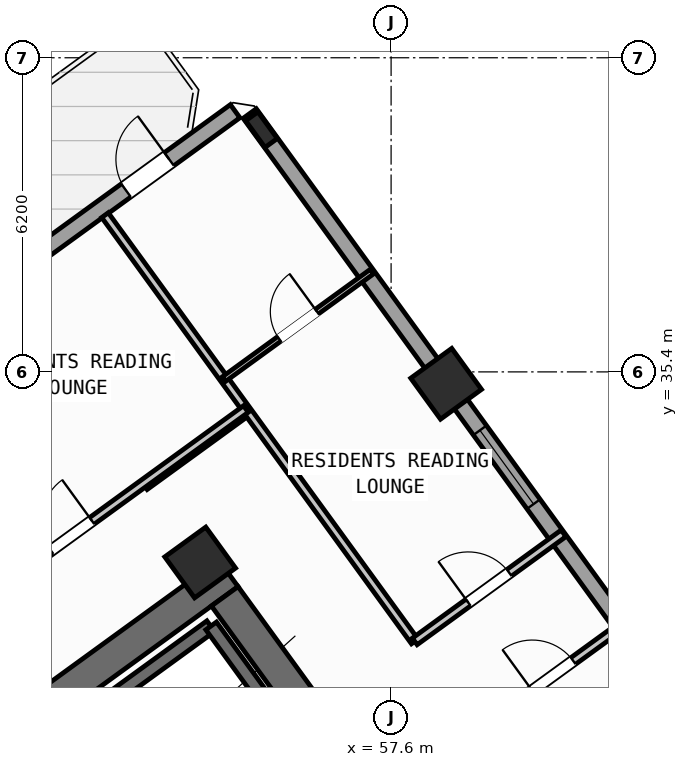
"""IFC4 building model, lengths in metres.
Left out: names, types, materials, properties, quantities, classifications, styles, units other than length and angle.
Written with IfcOpenShell. Run it as: python <this file> out.ifc"""

import sys

from ifc_helpers import new_model, si_unit, direction, frame, frame_2d, origin, origin_2d, place, context, subcontext, project, spatial, rectangle, hollow_rectangle, i_section, extrude, source, transform, mapped, element, fill, save


model = new_model("IFC4")
c1 = context("Model", 3, precision=1e-05, world=origin(), true_north=direction((0.0, 1.0)))
c2 = subcontext(c1, "Body", "Model", "MODEL_VIEW")
j1 = project(units=[si_unit("LENGTHUNIT", "METRE"), si_unit("PLANEANGLEUNIT", "RADIAN")], contexts=[c1])
p1 = place(None, origin())
s1 = spatial("IfcSite", under=j1, at=p1, CompositionType="ELEMENT")
p2 = place(p1, origin())
s2 = spatial("IfcBuilding", under=s1, at=p2, CompositionType="ELEMENT")
p3 = place(p2, frame((0.0, 0.0, 71.7)))
s3 = spatial("IfcBuildingStorey", under=s2, at=p3, CompositionType="ELEMENT", Elevation=71.7)
p4 = place(p3, frame((44.325, 24.113, 0.0), z_axis=(0.0, 0.0, 1.0), x_axis=(0.809012664862, 0.58779121131, 0.0)))
e1 = element("IfcWall", 1, at=p4, inside=s3, PredefinedType="SHEAR", context=c2, shape_type="SweptSolid", body=[
    extrude(rectangle(XDim=12.44, YDim=0.65, at=frame_2d((6.22, 0.0))), origin(), (0.0, 0.0, 1.0), 4.52),
])
p5 = place(p3, frame((58.064, 25.813, 0.0), z_axis=(0.0, 0.0, 1.0), x_axis=(-0.58777996584, 0.809020835181, 0.0)))
e2 = element("IfcWall", 2, at=p5, inside=s3, PredefinedType="SHEAR", context=c2, shape_type="SweptSolid", body=[
    extrude(rectangle(XDim=6.375, YDim=0.65, at=frame_2d((3.188, 0.0))), origin(), (0.0, 0.0, 1.0), 4.52),
])
m1 = source(origin(), c2, "Body", "SweptSolid", [
    extrude(hollow_rectangle(XDim=1.0, YDim=1.0, WallThickness=0.04, at=origin_2d()), origin(), (0.0, 0.0, 1.0), 4.8),
])
for number, where, z_axis, x_axis in (
    (3, (53.832, 31.638, 0.0), (0.0, 0.0, 1.0), (0.809, 0.588, 0.0)),
    (4, (58.686, 35.165, 0.0), (0.0, 0.0, 1.0), (0.809, 0.588, 0.0)),
):
    element("IfcColumn", number, at=place(p3, frame(where, z_axis=z_axis, x_axis=x_axis)), inside=s3, PredefinedType="COLUMN", context=c2, shape_type="MappedRepresentation", body=[
        mapped(m1, transform((0.0, 0.0, 0.0), scale=1.0)),
    ])
m2 = source(origin(), c2, "Body", "SweptSolid", [
    extrude(i_section(OverallWidth=0.3, OverallDepth=0.65, WebThickness=0.016, FlangeThickness=0.031, at=origin_2d()), origin(), (0.0, 0.0, 1.0), 4.8),
])
p6 = place(p3, frame((55.042, 40.181, 0.0), z_axis=(0.0, 0.0, 1.0), x_axis=(0.809016994375, 0.587785252292, 0.0)))
e5 = element("IfcColumn", 5, at=p6, inside=s3, PredefinedType="COLUMN", context=c2, shape_type="MappedRepresentation", body=[
    mapped(m2, transform((0.0, 0.0, 0.0), scale=1.0)),
])
p7 = place(p3, frame((42.207, 31.597, 0.0), z_axis=(0.0, 0.0, 1.0), x_axis=(0.809020333377, 0.587780656523, 0.0)))
e6 = element("IfcWall", 6, at=p7, inside=s3, PredefinedType="STANDARD", context=c2, shape_type="SweptSolid", body=[
    extrude(rectangle(XDim=15.223, YDim=0.32, at=frame_2d((7.611, 0.0))), origin(), (0.0, 0.0, 1.0), 4.52),
])
p8 = place(p7, frame((12.562, 0.0, 0.0)))
e7 = element("IfcOpeningElement", 7, at=p8, cuts=e6, PredefinedType="OPENING", context=c2, shape_type="SweptSolid", body=[
    extrude(rectangle(XDim=1.05, YDim=2.15, at=frame_2d((0.525, 1.075))), frame((0.0, 0.17, 0.0), z_axis=(0.0, -1.0, 0.0), x_axis=(1.0, 0.0, 0.0)), (0.0, 0.0, 1.0), 0.34),
])
p9 = place(p7, frame((0.868, 0.0, 0.85)))
e8 = element("IfcOpeningElement", 8, at=p9, cuts=e6, PredefinedType="OPENING", context=c2, shape_type="SweptSolid", body=[
    extrude(rectangle(XDim=1.8, YDim=1.5, at=frame_2d((0.9, 0.75))), frame((0.0, 0.17, 0.0), z_axis=(0.0, -1.0, 0.0), x_axis=(1.0, 0.0, 0.0)), (0.0, 0.0, 1.0), 0.34),
])
p10 = place(p7, frame((4.932, 0.0, 0.85)))
e9 = element("IfcOpeningElement", 9, at=p10, cuts=e6, PredefinedType="OPENING", context=c2, shape_type="SweptSolid", body=[
    extrude(rectangle(XDim=1.8, YDim=1.5, at=frame_2d((0.9, 0.75))), frame((0.0, 0.17, 0.0), z_axis=(0.0, -1.0, 0.0), x_axis=(1.0, 0.0, 0.0)), (0.0, 0.0, 1.0), 0.34),
])
p11 = place(p3, frame((54.81, 40.5, 0.0), z_axis=(0.0, 0.0, 1.0), x_axis=(0.587783625747, -0.809018176127, 0.0)))
e10 = element("IfcWall", 10, at=p11, inside=s3, PredefinedType="STANDARD", context=c2, shape_type="SweptSolid", body=[
    extrude(rectangle(XDim=21.587, YDim=0.32, at=frame_2d((10.794, 0.0))), origin(), (0.0, 0.0, 1.0), 3.895),
])
p12 = place(p11, frame((7.729, 0.0, 0.85)))
e11 = element("IfcOpeningElement", 11, at=p12, cuts=e10, PredefinedType="OPENING", context=c2, shape_type="SweptSolid", body=[
    extrude(rectangle(XDim=1.8, YDim=1.5, at=frame_2d((0.9, 0.75))), frame((0.0, 0.17, 0.0), z_axis=(0.0, -1.0, 0.0), x_axis=(1.0, 0.0, 0.0)), (0.0, 0.0, 1.0), 0.34),
])
p13 = place(p11, frame((15.292, 0.0, 0.85)))
e12 = element("IfcOpeningElement", 12, at=p13, cuts=e10, PredefinedType="OPENING", context=c2, shape_type="SweptSolid", body=[
    extrude(rectangle(XDim=1.8, YDim=1.5, at=frame_2d((0.9, 0.75))), frame((0.0, 0.17, 0.0), z_axis=(0.0, -1.0, 0.0), x_axis=(1.0, 0.0, 0.0)), (0.0, 0.0, 1.0), 0.34),
])
p14 = place(p11, frame((18.897, 0.0, 0.95)))
e13 = element("IfcOpeningElement", 13, at=p14, cuts=e10, PredefinedType="OPENING", context=c2, shape_type="SweptSolid", body=[
    extrude(rectangle(XDim=1.2, YDim=1.4, at=frame_2d((0.6, 0.7))), frame((0.0, 0.17, 0.0), z_axis=(0.0, -1.0, 0.0), x_axis=(1.0, 0.0, 0.0)), (0.0, 0.0, 1.0), 0.34),
])
p15 = place(p3, frame((48.006, 25.996, 0.0), z_axis=(0.0, 0.0, 1.0), x_axis=(0.80901903764, 0.587782439969, 0.0)))
e14 = element("IfcWall", 14, at=p15, inside=s3, PredefinedType="SHEAR", context=c2, shape_type="SweptSolid", body=[
    extrude(rectangle(XDim=7.46, YDim=0.26, at=frame_2d((3.73, 0.0))), origin(), (0.0, 0.0, 1.0), 4.52),
])
p16 = place(p3, frame((55.906, 27.831, 0.0), z_axis=(0.0, 0.0, 1.0), x_axis=(-0.587804123638, 0.809003283204, 0.0)))
e15 = element("IfcWall", 15, at=p16, inside=s3, PredefinedType="SHEAR", context=c2, shape_type="SweptSolid", body=[
    extrude(rectangle(XDim=3.16, YDim=0.26, at=frame_2d((1.58, 0.0))), origin(), (0.0, 0.0, 1.0), 4.52),
])
p17 = place(p3, frame((52.739, 33.143, 0.0), z_axis=(0.0, 0.0, 1.0), x_axis=(0.809000999347, 0.58780726693, 0.0)))
e16 = element("IfcWall", 16, at=p17, inside=s3, PredefinedType="PARTITIONING", context=c2, shape_type="SweptSolid", body=[
    extrude(rectangle(XDim=2.51, YDim=0.16, at=frame_2d((1.255, 0.0))), origin(), (0.0, 0.0, 1.0), 4.51),
])
p18 = place(p3, frame((58.067, 30.08, 0.0), z_axis=(0.0, 0.0, 1.0), x_axis=(-0.587787785243, 0.809015154073, 0.0)))
e17 = element("IfcWall", 17, at=p18, inside=s3, PredefinedType="PARTITIONING", context=c2, shape_type="SweptSolid", body=[
    extrude(rectangle(XDim=10.4, YDim=0.16, at=frame_2d((5.2, 0.0))), origin(), (0.0, 0.0, 1.0), 4.51),
])
p19 = place(p3, frame((59.331, 28.341, 0.0), z_axis=(0.0, 0.0, 1.0), x_axis=(0.809003564202, 0.587803736896, 0.0)))
e18 = element("IfcWall", 18, at=p19, inside=s3, PredefinedType="PARTITIONING", context=c2, shape_type="SweptSolid", body=[
    extrude(rectangle(XDim=3.63, YDim=0.16, at=frame_2d((1.815, 0.0))), origin(), (0.0, 0.0, 1.0), 4.51),
])
p20 = place(p19, frame((1.305, 0.0, 0.0)))
e19 = element("IfcOpeningElement", 19, at=p20, cuts=e18, PredefinedType="OPENING", context=c2, shape_type="SweptSolid", body=[
    extrude(rectangle(XDim=1.0, YDim=2.1, at=frame_2d((0.5, 1.05))), frame((0.0, 0.09, 0.0), z_axis=(0.0, -1.0, 0.0), x_axis=(1.0, 0.0, 0.0)), (0.0, 0.0, 1.0), 0.18),
])
p21 = place(p3, frame((58.067, 30.08, 0.0), z_axis=(0.0, 0.0, 1.0), x_axis=(0.809012309495, 0.587791700422, 0.0)))
e20 = element("IfcWall", 20, at=p21, inside=s3, PredefinedType="PARTITIONING", context=c2, shape_type="SweptSolid", body=[
    extrude(rectangle(XDim=3.63, YDim=0.16, at=frame_2d((1.815, 0.0))), origin(), (0.0, 0.0, 1.0), 4.51),
])
p22 = place(p21, frame((1.305, 0.0, 0.0)))
e21 = element("IfcOpeningElement", 21, at=p22, cuts=e20, PredefinedType="OPENING", context=c2, shape_type="SweptSolid", body=[
    extrude(rectangle(XDim=1.0, YDim=2.1, at=frame_2d((0.5, 1.05))), frame((0.0, 0.09, 0.0), z_axis=(0.0, -1.0, 0.0), x_axis=(1.0, 0.0, 0.0)), (0.0, 0.0, 1.0), 0.18),
])
p23 = place(p3, frame((54.304, 35.259, 0.0), z_axis=(0.0, 0.0, 1.0), x_axis=(0.809005039917, 0.58780170584, 0.0)))
e22 = element("IfcWall", 22, at=p23, inside=s3, PredefinedType="PARTITIONING", context=c2, shape_type="SweptSolid", body=[
    extrude(rectangle(XDim=3.61, YDim=0.11, at=frame_2d((1.805, 0.0))), origin(), (0.0, 0.0, 1.0), 4.51),
])
p24 = place(p23, frame((1.345, 0.0, 0.0)))
e23 = element("IfcOpeningElement", 23, at=p24, cuts=e22, PredefinedType="OPENING", context=c2, shape_type="SweptSolid", body=[
    extrude(rectangle(XDim=0.92, YDim=2.08, at=frame_2d((0.46, 1.04))), frame((0.0, 0.065, 0.0), z_axis=(0.0, -1.0, 0.0), x_axis=(1.0, 0.0, 0.0)), (0.0, 0.0, 1.0), 0.13),
])
p25 = place(p3, frame((42.866, 26.044, 0.0), z_axis=(0.0, 0.0, 1.0), x_axis=(0.809020254154, 0.587780765566, 0.0)))
e24 = element("IfcWall", 24, at=p25, inside=s3, PredefinedType="PARTITIONING", context=c2, shape_type="SweptSolid", body=[
    extrude(rectangle(XDim=14.67, YDim=0.16, at=frame_2d((7.335, 0.0))), origin(), (0.0, 0.0, 1.0), 4.51),
])
p26 = place(p25, frame((3.335, 0.0, 0.0)))
e25 = element("IfcOpeningElement", 25, at=p26, cuts=e24, PredefinedType="OPENING", context=c2, shape_type="SweptSolid", body=[
    extrude(rectangle(XDim=1.0, YDim=2.1, at=frame_2d((0.5, 1.05))), frame((0.0, 0.09, 0.0), z_axis=(0.0, -1.0, 0.0), x_axis=(1.0, 0.0, 0.0)), (0.0, 0.0, 1.0), 0.18),
])
p27 = place(p25, frame((9.915, 0.0, 0.0)))
e26 = element("IfcOpeningElement", 26, at=p27, cuts=e24, PredefinedType="OPENING", context=c2, shape_type="SweptSolid", body=[
    extrude(rectangle(XDim=1.0, YDim=2.1, at=frame_2d((0.5, 1.05))), frame((0.0, 0.09, 0.0), z_axis=(0.0, -1.0, 0.0), x_axis=(1.0, 0.0, 0.0)), (0.0, 0.0, 1.0), 0.18),
])
m3 = source(origin(), c2, "Body", "SweptSolid", [
    extrude(rectangle(XDim=1.05, YDim=2.15, at=frame_2d((0.525, 1.075))), frame((0.0, 0.025, 0.0), z_axis=(0.0, -1.0, 0.0), x_axis=(1.0, 0.0, 0.0)), (0.0, 0.0, 1.0), 0.05),
])
p28 = place(p8, origin())
e27 = element("IfcDoor", 27, at=p28, inside=s3, OperationType="SINGLE_SWING_RIGHT", PredefinedType="DOOR", context=c2, shape_type="MappedRepresentation", body=[
    mapped(m3, transform((0.0, 0.0, 0.0), scale=1.0)),
])
fill(e7, e27)
m4 = source(origin(), c2, "Body", "SweptSolid", [
    extrude(rectangle(XDim=1.8, YDim=1.5, at=frame_2d((0.9, 0.75))), frame((0.0, 0.03, 0.0), z_axis=(0.0, -1.0, 0.0), x_axis=(1.0, 0.0, 0.0)), (0.0, 0.0, 1.0), 0.06),
])
p29 = place(p12, origin())
e28 = element("IfcWindow", 28, at=p29, inside=s3, PartitioningType="SINGLE_PANEL", PredefinedType="WINDOW", context=c2, shape_type="MappedRepresentation", body=[
    mapped(m4, transform((0.0, 0.0, 0.0), scale=1.0)),
])
fill(e11, e28)
m5 = source(origin(), c2, "Body", "SweptSolid", [
    extrude(rectangle(XDim=1.0, YDim=2.1, at=frame_2d((0.5, 1.05))), frame((0.0, 0.025, 0.0), z_axis=(0.0, -1.0, 0.0), x_axis=(1.0, 0.0, 0.0)), (0.0, 0.0, 1.0), 0.05),
])
p30 = place(p22, origin())
e29 = element("IfcDoor", 29, at=p30, inside=s3, OperationType="SINGLE_SWING_LEFT", PredefinedType="DOOR", context=c2, shape_type="MappedRepresentation", body=[
    mapped(m5, transform((0.0, 0.0, 0.0), scale=1.0)),
])
fill(e21, e29)
m6 = source(origin(), c2, "Body", "SweptSolid", [
    extrude(rectangle(XDim=0.92, YDim=2.08, at=frame_2d((0.46, 1.04))), frame((0.0, 0.025, 0.0), z_axis=(0.0, -1.0, 0.0), x_axis=(1.0, 0.0, 0.0)), (0.0, 0.0, 1.0), 0.05),
])
p31 = place(p24, origin())
e30 = element("IfcDoor", 30, at=p31, inside=s3, OperationType="SINGLE_SWING_RIGHT", PredefinedType="DOOR", context=c2, shape_type="MappedRepresentation", body=[
    mapped(m6, transform((0.0, 0.0, 0.0), scale=1.0)),
])
fill(e23, e30)
p32 = place(p20, origin())
e31 = element("IfcDoor", 31, at=p32, inside=s3, OperationType="SINGLE_SWING_LEFT", PredefinedType="DOOR", context=c2, shape_type="MappedRepresentation", body=[
    mapped(m5, transform((0.0, 0.0, 0.0), scale=1.0)),
])
fill(e19, e31)
p33 = place(p27, origin())
e32 = element("IfcDoor", 32, at=p33, inside=s3, OperationType="SINGLE_SWING_RIGHT", PredefinedType="DOOR", context=c2, shape_type="MappedRepresentation", body=[
    mapped(m5, transform((0.0, 0.0, 0.0), scale=1.0)),
])
fill(e26, e32)
save(model, sys.argv[1])
